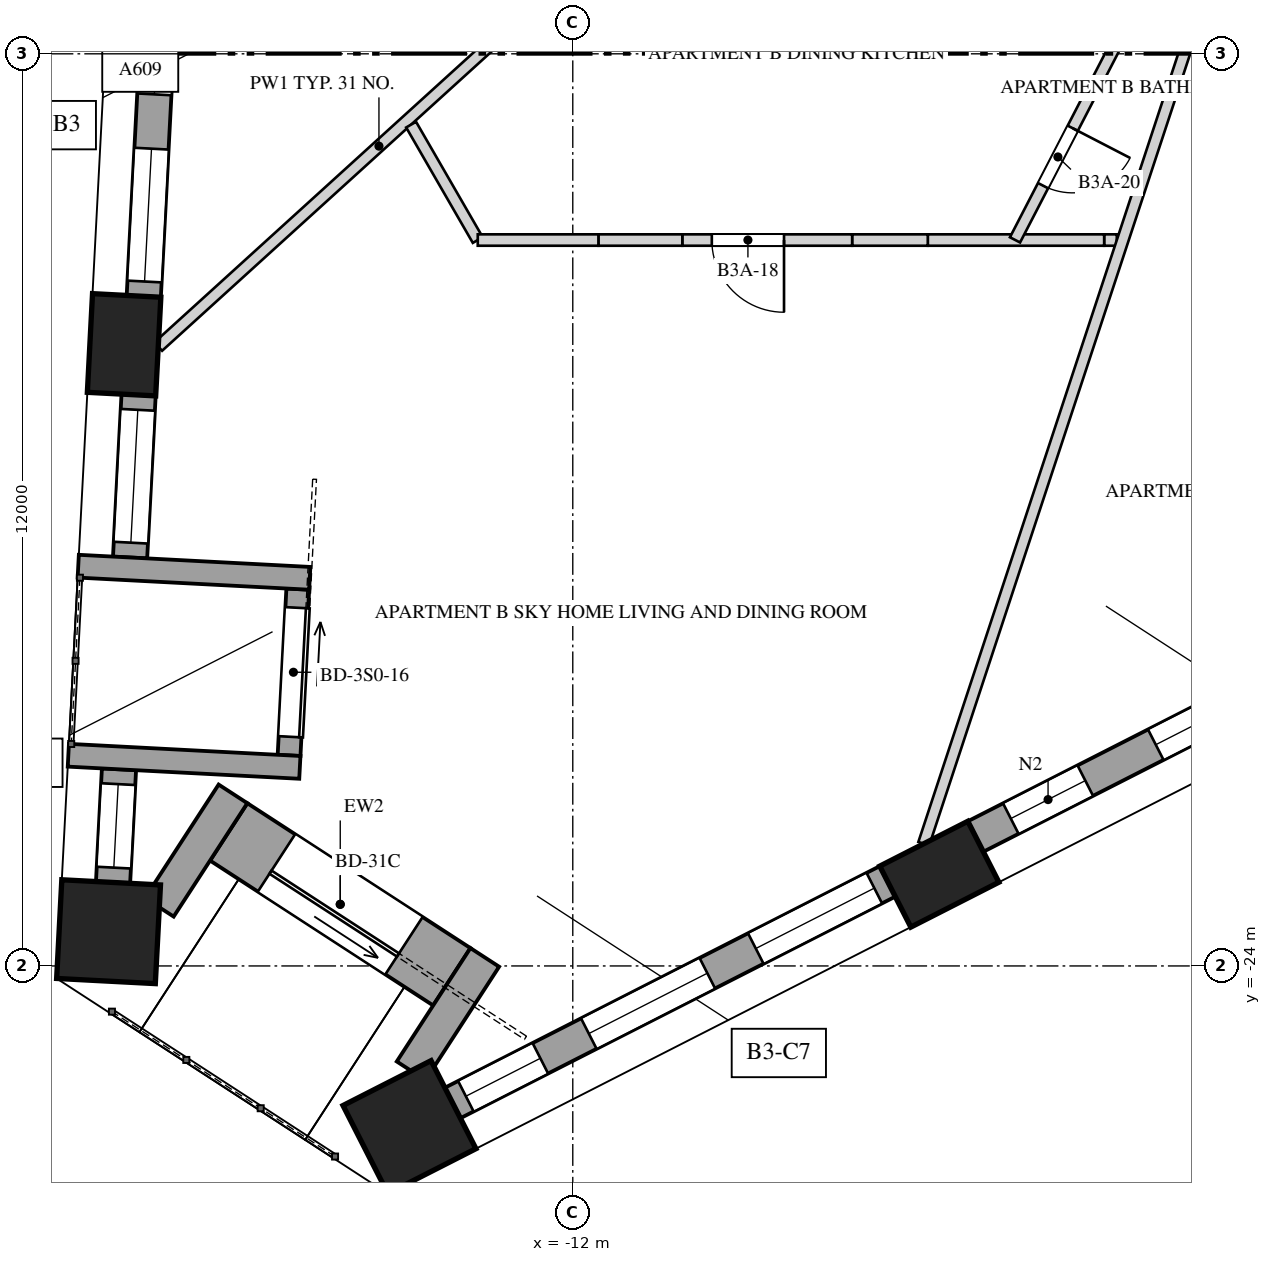
"""IFC4 building model, lengths in metres.
Left out: names, types, materials, properties, quantities, classifications, styles, units other than length and angle.
Written with IfcOpenShell. Run it as: python <this file> out.ifc"""

import sys

from ifc_helpers import new_model, si_unit, direction, frame, frame_2d, origin, origin_2d, place, context, subcontext, project, spatial, rectangle, extrude, element, fill, save


model = new_model("IFC4")
c1 = context("Model", 3, precision=1e-05, world=origin(), true_north=direction((0.0, 1.0)))
c2 = subcontext(c1, "Body", "Model", "MODEL_VIEW")
j1 = project(units=[si_unit("LENGTHUNIT", "METRE"), si_unit("PLANEANGLEUNIT", "RADIAN")], contexts=[c1])
p1 = place(None, origin())
s1 = spatial("IfcSite", under=j1, at=p1, CompositionType="ELEMENT")
p2 = place(p1, origin())
s2 = spatial("IfcBuilding", under=s1, at=p2, CompositionType="ELEMENT")
p3 = place(p2, frame((0.0, 0.0, 133.6)))
s3 = spatial("IfcBuildingStorey", under=s2, at=p3, CompositionType="ELEMENT", Elevation=133.6)
p4 = place(p3, frame((-17.903, -15.828, 0.0), z_axis=(0.0, 0.0, 1.0), x_axis=(-0.052335956243, -0.998629534755, 0.0)))
e1 = element("IfcColumn", 1, at=p4, inside=s3, PredefinedType="COLUMN", context=c2, shape_type="SweptSolid", body=[
    extrude(rectangle(XDim=1.3, YDim=0.9, at=origin_2d()), origin(), (0.0, 0.0, 1.0), 4.0),
])
for number, where, z_axis, x_axis in (
    (2, (-18.107, -23.549, 0.0), (0.0, 0.0, 1.0), (-0.052, -0.999, 0.0)),
    (3, (-14.148, -26.12, 0.0), (0.0, 0.0, 1.0), (0.891, 0.454, 0.0)),
):
    element("IfcColumn", number, at=place(p3, frame(where, z_axis=z_axis, x_axis=x_axis)), inside=s3, PredefinedType="COLUMN", context=c2, shape_type="SweptSolid", body=[
        extrude(rectangle(XDim=1.3, YDim=1.3, at=origin_2d()), origin(), (0.0, 0.0, 1.0), 4.0),
    ])
p5 = place(p3, frame((-7.178, -22.793, 0.0), z_axis=(0.0, 0.0, 1.0), x_axis=(0.891006524188, 0.45399049974, 0.0)))
e4 = element("IfcColumn", 4, at=p5, inside=s3, PredefinedType="COLUMN", context=c2, shape_type="SweptSolid", body=[
    extrude(rectangle(XDim=1.3, YDim=0.9, at=origin_2d()), origin(), (0.0, 0.0, 1.0), 4.0),
])
p6 = place(p3, frame((-17.274, -8.129, 0.0), z_axis=(0.0, 0.0, 1.0), x_axis=(-0.052339570873, -0.998629345313, 0.0)))
e5 = element("IfcWall", 5, at=p6, inside=s3, PredefinedType="SOLIDWALL", context=c2, shape_type="SweptSolid", body=[
    extrude(rectangle(XDim=7.072, YDim=0.45, at=frame_2d((3.536, 0.0))), origin(), (0.0, 0.0, 1.0), 3.3),
])
p7 = place(p6, frame((0.195, 0.0, 0.5)))
e6 = element("IfcOpeningElement", 6, at=p7, cuts=e5, PredefinedType="OPENING", context=c2, shape_type="SweptSolid", body=[
    extrude(rectangle(XDim=1.75, YDim=2.65, at=frame_2d((0.875, 1.325))), frame((0.0, 0.235, 0.0), z_axis=(0.0, -1.0, 0.0), x_axis=(1.0, 0.0, 0.0)), (0.0, 0.0, 1.0), 0.47),
])
p8 = place(p6, frame((2.661, 0.0, 0.5)))
e7 = element("IfcOpeningElement", 7, at=p8, cuts=e5, PredefinedType="OPENING", context=c2, shape_type="SweptSolid", body=[
    extrude(rectangle(XDim=1.75, YDim=2.65, at=frame_2d((0.875, 1.325))), frame((0.0, 0.235, 0.0), z_axis=(0.0, -1.0, 0.0), x_axis=(1.0, 0.0, 0.0)), (0.0, 0.0, 1.0), 0.47),
])
p9 = place(p6, frame((5.126, 0.0, 0.5)))
e8 = element("IfcOpeningElement", 8, at=p9, cuts=e5, PredefinedType="OPENING", context=c2, shape_type="SweptSolid", body=[
    extrude(rectangle(XDim=1.75, YDim=2.0, at=frame_2d((0.875, 1.0))), frame((0.0, 0.235, 0.0), z_axis=(0.0, -1.0, 0.0), x_axis=(1.0, 0.0, 0.0)), (0.0, 0.0, 1.0), 0.47),
])
p10 = place(p3, frame((-17.712, -16.489, 0.0), z_axis=(0.0, 0.0, 1.0), x_axis=(-0.05234931875, -0.998628834366, 0.0)))
e9 = element("IfcWall", 9, at=p10, inside=s3, PredefinedType="SOLIDWALL", context=c2, shape_type="SweptSolid", body=[
    extrude(rectangle(XDim=2.141, YDim=0.45, at=frame_2d((1.07, 0.0))), origin(), (0.0, 0.0, 1.0), 3.3),
])
p11 = place(p10, frame((0.195, 0.0, 0.5)))
e10 = element("IfcOpeningElement", 10, at=p11, cuts=e9, PredefinedType="OPENING", context=c2, shape_type="SweptSolid", body=[
    extrude(rectangle(XDim=1.75, YDim=2.65, at=frame_2d((0.875, 1.325))), frame((0.0, 0.235, 0.0), z_axis=(0.0, -1.0, 0.0), x_axis=(1.0, 0.0, 0.0)), (0.0, 0.0, 1.0), 0.47),
])
p12 = place(p3, frame((-17.97, -21.413, 0.0), z_axis=(0.0, 0.0, 1.0), x_axis=(-0.052412688754, -0.998625510418, 0.0)))
e11 = element("IfcWall", 11, at=p12, inside=s3, PredefinedType="SOLIDWALL", context=c2, shape_type="SweptSolid", body=[
    extrude(rectangle(XDim=1.49, YDim=0.45, at=frame_2d((0.745, 0.0))), origin(), (0.0, 0.0, 1.0), 3.3),
])
p13 = place(p12, frame((0.195, 0.0, 0.5)))
e12 = element("IfcOpeningElement", 12, at=p13, cuts=e11, PredefinedType="OPENING", context=c2, shape_type="SweptSolid", body=[
    extrude(rectangle(XDim=1.1, YDim=2.0, at=frame_2d((0.55, 1.0))), frame((0.0, 0.235, 0.0), z_axis=(0.0, -1.0, 0.0), x_axis=(1.0, 0.0, 0.0)), (0.0, 0.0, 1.0), 0.47),
])
p14 = place(p3, frame((-13.581, -25.803, 0.0), z_axis=(0.0, 0.0, 1.0), x_axis=(0.891010191031, 0.453983303085, 0.0)))
e13 = element("IfcWall", 13, at=p14, inside=s3, PredefinedType="SOLIDWALL", context=c2, shape_type="SweptSolid", body=[
    extrude(rectangle(XDim=6.422, YDim=0.45, at=frame_2d((3.211, 0.0))), origin(), (0.0, 0.0, 1.0), 3.3),
])
p15 = place(p14, frame((0.195, 0.0, 0.5)))
e14 = element("IfcOpeningElement", 14, at=p15, cuts=e13, PredefinedType="OPENING", context=c2, shape_type="SweptSolid", body=[
    extrude(rectangle(XDim=1.1, YDim=2.0, at=frame_2d((0.55, 1.0))), frame((0.0, 0.235, 0.0), z_axis=(0.0, -1.0, 0.0), x_axis=(1.0, 0.0, 0.0)), (0.0, 0.0, 1.0), 0.47),
])
p16 = place(p14, frame((2.011, 0.0, 0.5)))
e15 = element("IfcOpeningElement", 15, at=p16, cuts=e13, PredefinedType="OPENING", context=c2, shape_type="SweptSolid", body=[
    extrude(rectangle(XDim=1.75, YDim=2.65, at=frame_2d((0.875, 1.325))), frame((0.0, 0.235, 0.0), z_axis=(0.0, -1.0, 0.0), x_axis=(1.0, 0.0, 0.0)), (0.0, 0.0, 1.0), 0.47),
])
p17 = place(p14, frame((4.476, 0.0, 0.5)))
e16 = element("IfcOpeningElement", 16, at=p17, cuts=e13, PredefinedType="OPENING", context=c2, shape_type="SweptSolid", body=[
    extrude(rectangle(XDim=1.75, YDim=2.65, at=frame_2d((0.875, 1.325))), frame((0.0, 0.235, 0.0), z_axis=(0.0, -1.0, 0.0), x_axis=(1.0, 0.0, 0.0)), (0.0, 0.0, 1.0), 0.47),
])
p18 = place(p3, frame((-6.701, -22.297, 0.0), z_axis=(0.0, 0.0, 1.0), x_axis=(0.891004189171, 0.45399508244, 0.0)))
e17 = element("IfcWall", 17, at=p18, inside=s3, PredefinedType="SOLIDWALL", context=c2, shape_type="SweptSolid", body=[
    extrude(rectangle(XDim=7.072, YDim=0.45, at=frame_2d((3.536, 0.0))), origin(), (0.0, 0.0, 1.0), 3.3),
])
p19 = place(p18, frame((0.52, 0.0, 0.5)))
e18 = element("IfcOpeningElement", 18, at=p19, cuts=e17, PredefinedType="OPENING", context=c2, shape_type="SweptSolid", body=[
    extrude(rectangle(XDim=1.1, YDim=2.65, at=frame_2d((0.55, 1.325))), frame((0.0, 0.235, 0.0), z_axis=(0.0, -1.0, 0.0), x_axis=(1.0, 0.0, 0.0)), (0.0, 0.0, 1.0), 0.47),
])
p20 = place(p18, frame((2.661, 0.0, 0.5)))
e19 = element("IfcOpeningElement", 19, at=p20, cuts=e17, PredefinedType="OPENING", context=c2, shape_type="SweptSolid", body=[
    extrude(rectangle(XDim=1.75, YDim=2.65, at=frame_2d((0.875, 1.325))), frame((0.0, 0.235, 0.0), z_axis=(0.0, -1.0, 0.0), x_axis=(1.0, 0.0, 0.0)), (0.0, 0.0, 1.0), 0.47),
])
p21 = place(p18, frame((5.126, 0.0, 0.5)))
e20 = element("IfcOpeningElement", 20, at=p21, cuts=e17, PredefinedType="OPENING", context=c2, shape_type="SweptSolid", body=[
    extrude(rectangle(XDim=1.75, YDim=2.65, at=frame_2d((0.875, 1.325))), frame((0.0, 0.235, 0.0), z_axis=(0.0, -1.0, 0.0), x_axis=(1.0, 0.0, 0.0)), (0.0, 0.0, 1.0), 0.47),
])
p22 = place(p3, frame((-15.618, -19.042, 0.0), z_axis=(0.0, 0.0, 1.0), x_axis=(-0.052383338583, -0.998627050424, 0.0)))
e21 = element("IfcWall", 21, at=p22, inside=s3, PredefinedType="SOLIDWALL", context=c2, shape_type="SweptSolid", body=[
    extrude(rectangle(XDim=2.19, YDim=0.3, at=frame_2d((1.095, 0.0))), origin(), (0.0, 0.0, 1.0), 3.3),
])
p23 = place(p22, frame((0.245, 0.0, 0.0)))
e22 = element("IfcOpeningElement", 22, at=p23, cuts=e21, PredefinedType="OPENING", context=c2, shape_type="SweptSolid", body=[
    extrude(rectangle(XDim=1.7, YDim=2.45, at=frame_2d((0.85, 1.225))), frame((0.0, 0.16, 0.0), z_axis=(0.0, -1.0, 0.0), x_axis=(1.0, 0.0, 0.0)), (0.0, 0.0, 1.0), 0.32),
])
for number, where, z_axis, x_axis in (
    (23, (-18.506, -18.741, 0.0), (0.0, 0.0, 1.0), (0.999, -0.052, 0.0)),
    (24, (-18.636, -21.228, 0.0), (0.0, 0.0, 1.0), (0.999, -0.052, 0.0)),
):
    element("IfcWall", number, at=place(p3, frame(where, z_axis=z_axis, x_axis=x_axis)), inside=s3, PredefinedType="SOLIDWALL", context=c2, shape_type="SweptSolid", body=[
        extrude(rectangle(XDim=3.05, YDim=0.3, at=frame_2d((1.525, 0.0))), origin(), (0.0, 0.0, 1.0), 3.3),
    ])
p24 = place(p3, frame((-13.592, -24.142, 0.0), z_axis=(0.0, 0.0, 1.0), x_axis=(-0.838665071449, 0.544647498784, 0.0)))
e25 = element("IfcWall", 25, at=p24, inside=s3, PredefinedType="SOLIDWALL", context=c2, shape_type="SweptSolid", body=[
    extrude(rectangle(XDim=3.5, YDim=0.9, at=frame_2d((1.75, 0.0))), origin(), (0.0, 0.0, 1.0), 3.3),
])
p25 = place(p24, frame((0.75, 0.0, 0.0)))
e26 = element("IfcOpeningElement", 26, at=p25, cuts=e25, PredefinedType="OPENING", context=c2, shape_type="SweptSolid", body=[
    extrude(rectangle(XDim=2.0, YDim=2.4, at=frame_2d((1.0, 1.2))), frame((0.0, 0.46, 0.0), z_axis=(0.0, -1.0, 0.0), x_axis=(1.0, 0.0, 0.0)), (0.0, 0.0, 1.0), 0.92),
])
for number, where, z_axis, x_axis in (
    (27, (-14.127, -25.38, 0.0), (0.0, 0.0, 1.0), (0.545, 0.839, 0.0)),
    (28, (-17.44, -23.228, 0.0), (0.0, 0.0, 1.0), (0.545, 0.839, 0.0)),
):
    element("IfcWall", number, at=place(p3, frame(where, z_axis=z_axis, x_axis=x_axis)), inside=s3, PredefinedType="SOLIDWALL", context=c2, shape_type="SweptSolid", body=[
        extrude(rectangle(XDim=1.779, YDim=0.45, at=frame_2d((0.89, 0.0))), origin(), (0.0, 0.0, 1.0), 2.55),
    ])
p26 = place(p3, frame((-17.454, -15.851, 0.0), z_axis=(0.0, 0.0, 1.0), x_axis=(0.740276567096, 0.672302464824, 0.0)))
e29 = element("IfcWall", 29, at=p26, inside=s3, PredefinedType="PARTITIONING", context=c2, shape_type="SweptSolid", body=[
    extrude(rectangle(XDim=7.844, YDim=0.15, at=frame_2d((3.922, 0.0))), origin(), (0.0, 0.0, 1.0), 2.75),
])
p27 = place(p3, frame((-13.25, -14.45, 0.0), z_axis=(0.0, 0.0, 1.0), x_axis=(-0.500047902311, 0.865997745606, 0.0)))
e30 = element("IfcWall", 30, at=p27, inside=s3, PredefinedType="PARTITIONING", context=c2, shape_type="SweptSolid", body=[
    extrude(rectangle(XDim=1.753, YDim=0.15, at=frame_2d((0.876, 0.0))), origin(), (0.0, 0.0, 1.0), 3.65),
])
p28 = place(p3, frame((-4.843, -14.45, 0.0), z_axis=(0.0, 0.0, 1.0), x_axis=(-1.0, 0.0, 0.0)))
e31 = element("IfcWall", 31, at=p28, inside=s3, PredefinedType="PARTITIONING", context=c2, shape_type="SweptSolid", body=[
    extrude(rectangle(XDim=0.166, YDim=0.15, at=frame_2d((0.083, 0.0))), origin(), (0.0, 0.0, 1.0), 2.55),
])
p29 = place(p3, frame((-5.009, -14.45, 0.0), z_axis=(0.0, 0.0, 1.0), x_axis=(-1.0, 0.0, 0.0)))
e32 = element("IfcWall", 32, at=p29, inside=s3, PredefinedType="PARTITIONING", context=c2, shape_type="SweptSolid", body=[
    extrude(rectangle(XDim=2.321, YDim=0.15, at=frame_2d((1.16, 0.0))), origin(), (0.0, 0.0, 1.0), 3.65),
])
p30 = place(p3, frame((-7.33, -14.45, 0.0), z_axis=(0.0, 0.0, 1.0), x_axis=(-1.0, 0.0, 0.0)))
e33 = element("IfcWall", 33, at=p30, inside=s3, PredefinedType="PARTITIONING", context=c2, shape_type="SweptSolid", body=[
    extrude(rectangle(XDim=0.995, YDim=0.15, at=frame_2d((0.498, 0.0))), origin(), (0.0, 0.0, 1.0), 2.55),
])
p31 = place(p3, frame((-8.325, -14.45, 0.0), z_axis=(0.0, 0.0, 1.0), x_axis=(-1.0, 0.0, 0.0)))
e34 = element("IfcWall", 34, at=p31, inside=s3, PredefinedType="PARTITIONING", context=c2, shape_type="SweptSolid", body=[
    extrude(rectangle(XDim=2.234, YDim=0.15, at=frame_2d((1.117, 0.0))), origin(), (0.0, 0.0, 1.0), 3.65),
])
p32 = place(p31, frame((0.896, 0.0, 0.0)))
e35 = element("IfcOpeningElement", 35, at=p32, cuts=e34, PredefinedType="OPENING", context=c2, shape_type="SweptSolid", body=[
    extrude(rectangle(XDim=0.95, YDim=2.4, at=frame_2d((0.475, 1.2))), frame((0.0, 0.085, 0.0), z_axis=(0.0, -1.0, 0.0), x_axis=(1.0, 0.0, 0.0)), (0.0, 0.0, 1.0), 0.17),
])
p33 = place(p3, frame((-10.559, -14.45, 0.0), z_axis=(0.0, 0.0, 1.0), x_axis=(-1.0, 0.0, 0.0)))
e36 = element("IfcWall", 36, at=p33, inside=s3, PredefinedType="PARTITIONING", context=c2, shape_type="SweptSolid", body=[
    extrude(rectangle(XDim=1.104, YDim=0.15, at=frame_2d((0.552, 0.0))), origin(), (0.0, 0.0, 1.0), 2.55),
])
p34 = place(p3, frame((-11.663, -14.45, 0.0), z_axis=(0.0, 0.0, 1.0), x_axis=(-1.0, 0.0, 0.0)))
e37 = element("IfcWall", 37, at=p34, inside=s3, PredefinedType="PARTITIONING", context=c2, shape_type="SweptSolid", body=[
    extrude(rectangle(XDim=1.587, YDim=0.15, at=frame_2d((0.794, 0.0))), origin(), (0.0, 0.0, 1.0), 3.65),
])
p35 = place(p3, frame((-4.425, -11.052, 0.0), z_axis=(0.0, 0.0, 1.0), x_axis=(-0.459481978347, -0.888187092664, 0.0)))
e38 = element("IfcWall", 38, at=p35, inside=s3, PredefinedType="PARTITIONING", context=c2, shape_type="SweptSolid", body=[
    extrude(rectangle(XDim=3.823, YDim=0.15, at=frame_2d((1.912, 0.0))), origin(), (0.0, 0.0, 1.0), 3.65),
])
p36 = place(p35, frame((2.17, 0.0, 0.0)))
e39 = element("IfcOpeningElement", 39, at=p36, cuts=e38, PredefinedType="OPENING", context=c2, shape_type="SweptSolid", body=[
    extrude(rectangle(XDim=0.85, YDim=2.4, at=frame_2d((0.425, 1.2))), frame((0.0, 0.085, 0.0), z_axis=(0.0, -1.0, 0.0), x_axis=(1.0, 0.0, 0.0)), (0.0, 0.0, 1.0), 0.17),
])
p37 = place(p3, frame((-3.668, -11.125, 0.0), z_axis=(0.0, 0.0, 1.0), x_axis=(-0.313095908813, -0.949721512805, 0.0)))
e40 = element("IfcWall", 40, at=p37, inside=s3, PredefinedType="PARTITIONING", context=c2, shape_type="SweptSolid", body=[
    extrude(rectangle(XDim=11.863, YDim=0.15, at=frame_2d((5.932, 0.0))), origin(), (0.0, 0.0, 1.0), 2.55),
])
p38 = place(p8, origin())
e41 = element("IfcWindow", 41, at=p38, inside=s3, PartitioningType="SINGLE_PANEL", PredefinedType="WINDOW", context=c2, shape_type="SweptSolid", body=[
    extrude(rectangle(XDim=1.75, YDim=2.65, at=frame_2d((0.875, 1.325))), frame((0.0, 0.03, 0.0), z_axis=(0.0, -1.0, 0.0), x_axis=(1.0, 0.0, 0.0)), (0.0, 0.0, 1.0), 0.06),
])
fill(e7, e41)
p39 = place(p9, origin())
e42 = element("IfcWindow", 42, at=p39, inside=s3, PartitioningType="SINGLE_PANEL", PredefinedType="WINDOW", context=c2, shape_type="SweptSolid", body=[
    extrude(rectangle(XDim=1.75, YDim=2.0, at=frame_2d((0.875, 1.0))), frame((0.0, 0.03, 0.0), z_axis=(0.0, -1.0, 0.0), x_axis=(1.0, 0.0, 0.0)), (0.0, 0.0, 1.0), 0.06),
])
fill(e8, e42)
p40 = place(p11, origin())
e43 = element("IfcWindow", 43, at=p40, inside=s3, PartitioningType="SINGLE_PANEL", PredefinedType="WINDOW", context=c2, shape_type="SweptSolid", body=[
    extrude(rectangle(XDim=1.75, YDim=2.65, at=frame_2d((0.875, 1.325))), frame((0.0, 0.03, 0.0), z_axis=(0.0, -1.0, 0.0), x_axis=(1.0, 0.0, 0.0)), (0.0, 0.0, 1.0), 0.06),
])
fill(e10, e43)
p41 = place(p13, origin())
e44 = element("IfcWindow", 44, at=p41, inside=s3, PartitioningType="SINGLE_PANEL", PredefinedType="WINDOW", context=c2, shape_type="SweptSolid", body=[
    extrude(rectangle(XDim=1.1, YDim=2.0, at=frame_2d((0.55, 1.0))), frame((0.0, 0.03, 0.0), z_axis=(0.0, -1.0, 0.0), x_axis=(1.0, 0.0, 0.0)), (0.0, 0.0, 1.0), 0.06),
])
fill(e12, e44)
p42 = place(p15, origin())
e45 = element("IfcWindow", 45, at=p42, inside=s3, PartitioningType="SINGLE_PANEL", PredefinedType="WINDOW", context=c2, shape_type="SweptSolid", body=[
    extrude(rectangle(XDim=1.1, YDim=2.0, at=frame_2d((0.55, 1.0))), frame((0.0, 0.03, 0.0), z_axis=(0.0, -1.0, 0.0), x_axis=(1.0, 0.0, 0.0)), (0.0, 0.0, 1.0), 0.06),
])
fill(e14, e45)
p43 = place(p16, origin())
e46 = element("IfcWindow", 46, at=p43, inside=s3, PartitioningType="SINGLE_PANEL", PredefinedType="WINDOW", context=c2, shape_type="SweptSolid", body=[
    extrude(rectangle(XDim=1.75, YDim=2.65, at=frame_2d((0.875, 1.325))), frame((0.0, 0.03, 0.0), z_axis=(0.0, -1.0, 0.0), x_axis=(1.0, 0.0, 0.0)), (0.0, 0.0, 1.0), 0.06),
])
fill(e15, e46)
p44 = place(p17, origin())
e47 = element("IfcWindow", 47, at=p44, inside=s3, PartitioningType="SINGLE_PANEL", PredefinedType="WINDOW", context=c2, shape_type="SweptSolid", body=[
    extrude(rectangle(XDim=1.75, YDim=2.65, at=frame_2d((0.875, 1.325))), frame((0.0, 0.03, 0.0), z_axis=(0.0, -1.0, 0.0), x_axis=(1.0, 0.0, 0.0)), (0.0, 0.0, 1.0), 0.06),
])
fill(e16, e47)
p45 = place(p19, origin())
e48 = element("IfcWindow", 48, at=p45, inside=s3, PartitioningType="SINGLE_PANEL", PredefinedType="WINDOW", context=c2, shape_type="SweptSolid", body=[
    extrude(rectangle(XDim=1.1, YDim=2.65, at=frame_2d((0.55, 1.325))), frame((0.0, 0.03, 0.0), z_axis=(0.0, -1.0, 0.0), x_axis=(1.0, 0.0, 0.0)), (0.0, 0.0, 1.0), 0.06),
])
fill(e18, e48)
p46 = place(p20, origin())
e49 = element("IfcWindow", 49, at=p46, inside=s3, PartitioningType="SINGLE_PANEL", PredefinedType="WINDOW", context=c2, shape_type="SweptSolid", body=[
    extrude(rectangle(XDim=1.75, YDim=2.65, at=frame_2d((0.875, 1.325))), frame((0.0, 0.03, 0.0), z_axis=(0.0, -1.0, 0.0), x_axis=(1.0, 0.0, 0.0)), (0.0, 0.0, 1.0), 0.06),
])
fill(e19, e49)
p47 = place(p23, origin())
e50 = element("IfcDoor", 50, at=p47, inside=s3, OperationType="SLIDING_TO_LEFT", PredefinedType="DOOR", context=c2, shape_type="SweptSolid", body=[
    extrude(rectangle(XDim=1.7, YDim=2.45, at=frame_2d((0.85, 1.225))), frame((0.0, 0.025, 0.0), z_axis=(0.0, -1.0, 0.0), x_axis=(1.0, 0.0, 0.0)), (0.0, 0.0, 1.0), 0.05),
])
fill(e22, e50)
p48 = place(p25, origin())
e51 = element("IfcDoor", 51, at=p48, inside=s3, OperationType="SLIDING_TO_LEFT", PredefinedType="DOOR", context=c2, shape_type="SweptSolid", body=[
    extrude(rectangle(XDim=2.0, YDim=2.4, at=frame_2d((1.0, 1.2))), frame((0.0, 0.025, 0.0), z_axis=(0.0, -1.0, 0.0), x_axis=(1.0, 0.0, 0.0)), (0.0, 0.0, 1.0), 0.05),
])
fill(e26, e51)
p49 = place(p32, origin())
e52 = element("IfcDoor", 52, at=p49, inside=s3, OperationType="SINGLE_SWING_RIGHT", PredefinedType="DOOR", context=c2, shape_type="SweptSolid", body=[
    extrude(rectangle(XDim=0.95, YDim=2.4, at=frame_2d((0.475, 1.2))), frame((0.0, 0.025, 0.0), z_axis=(0.0, -1.0, 0.0), x_axis=(1.0, 0.0, 0.0)), (0.0, 0.0, 1.0), 0.05),
])
fill(e35, e52)
p50 = place(p36, origin())
e53 = element("IfcDoor", 53, at=p50, inside=s3, OperationType="SINGLE_SWING_RIGHT", PredefinedType="DOOR", context=c2, shape_type="SweptSolid", body=[
    extrude(rectangle(XDim=0.85, YDim=2.4, at=frame_2d((0.425, 1.2))), frame((0.0, 0.025, 0.0), z_axis=(0.0, -1.0, 0.0), x_axis=(1.0, 0.0, 0.0)), (0.0, 0.0, 1.0), 0.05),
])
fill(e39, e53)
save(model, sys.argv[1])
